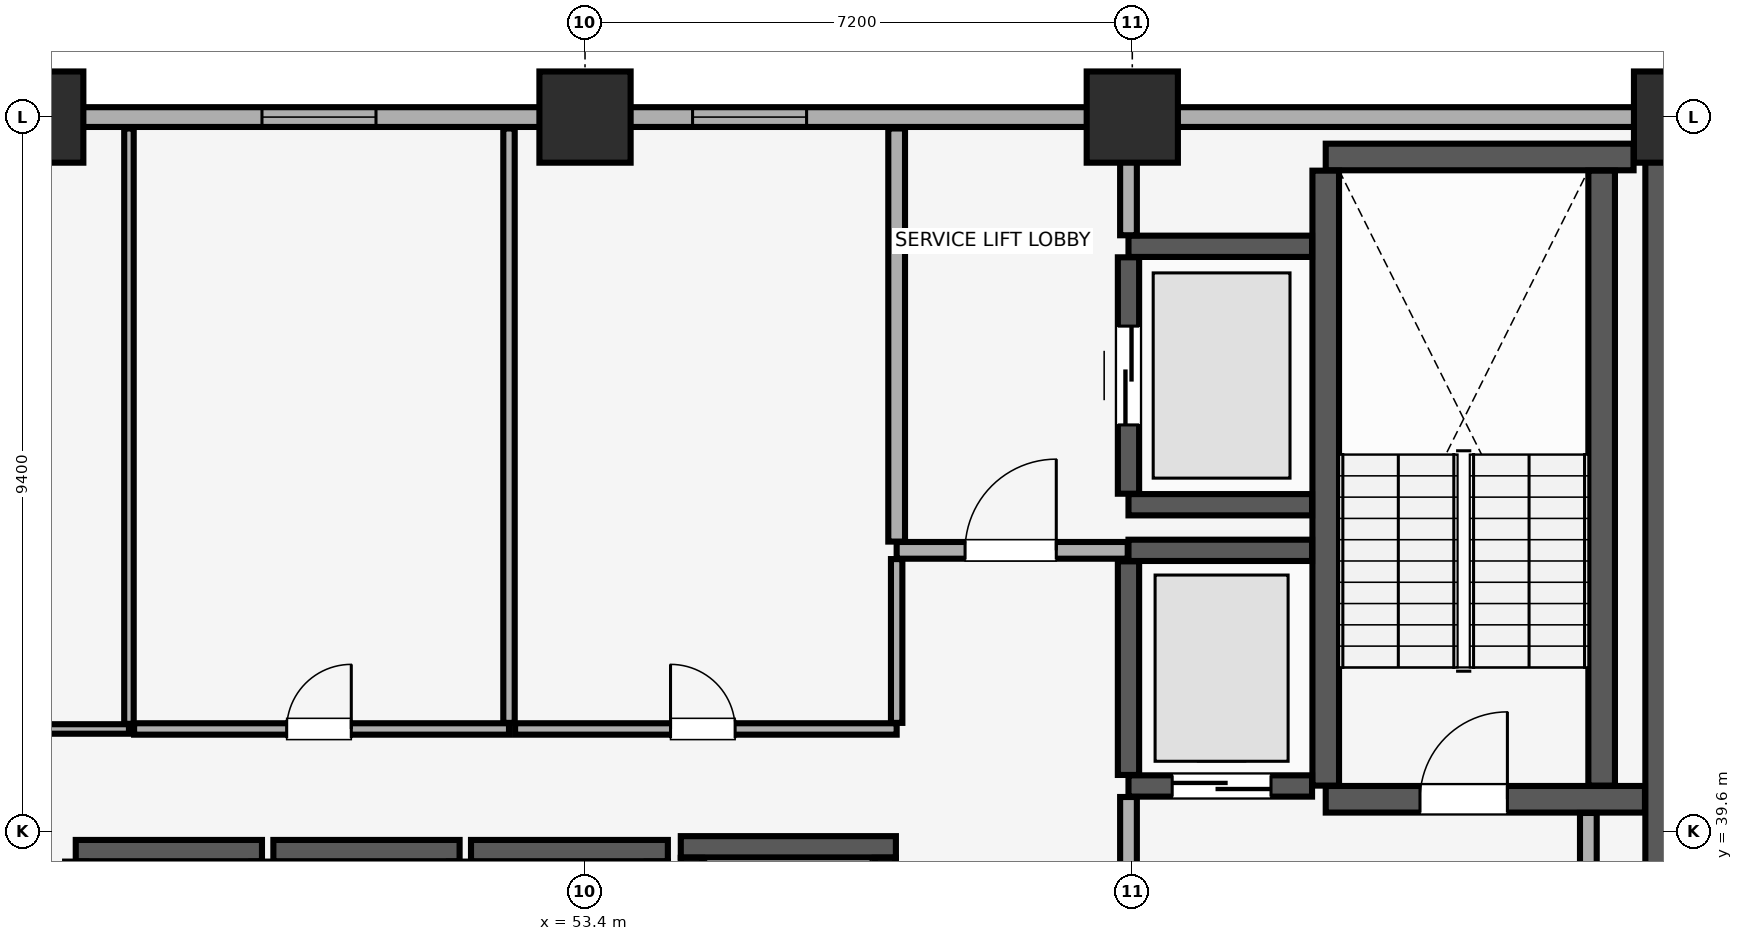
"""IFC4 building model, lengths in metres.
Left out: names, types, materials, properties, quantities, classifications, styles, units other than length and angle.
Written with IfcOpenShell. Run it as: python <this file> out.ifc"""

import sys

from ifc_helpers import new_model, si_unit, direction, frame, frame_2d, origin, origin_2d, place, context, subcontext, project, spatial, rectangle, extrude, element, fill, save


model = new_model("IFC4")
c1 = context("Model", 3, precision=1e-05, world=origin(), true_north=direction((0.0, 1.0)))
c2 = subcontext(c1, "Body", "Model", "MODEL_VIEW")
j1 = project(units=[si_unit("LENGTHUNIT", "METRE"), si_unit("PLANEANGLEUNIT", "RADIAN")], contexts=[c1])
p1 = place(None, origin())
s1 = spatial("IfcSite", under=j1, at=p1, CompositionType="ELEMENT")
p2 = place(p1, origin())
s2 = spatial("IfcBuilding", under=s1, at=p2, CompositionType="ELEMENT")
p3 = place(p2, frame((0.0, 0.0, 104.3)))
s3 = spatial("IfcBuildingStorey", under=s2, at=p3, CompositionType="ELEMENT", Elevation=104.3)
for number, where, z_axis, x_axis in (
    (1, (46.2, 49.0, 0.0), (0.0, 0.0, 1.0), (1.0, 0.0, 0.0)),
    (2, (53.4, 49.0, 0.0), (0.0, 0.0, 1.0), (1.0, 0.0, 0.0)),
    (3, (60.6, 49.0, 0.0), (0.0, 0.0, 1.0), (1.0, 0.0, 0.0)),
    (4, (67.8, 49.0, 0.0), (0.0, 0.0, 1.0), (1.0, 0.0, 0.0)),
):
    element("IfcColumn", number, at=place(p3, frame(where, z_axis=z_axis, x_axis=x_axis)), inside=s3, PredefinedType="COLUMN", context=c2, shape_type="SweptSolid", body=[
        extrude(rectangle(XDim=1.2, YDim=1.2, at=origin_2d()), origin(), (0.0, 0.0, 1.0), 3.51),
    ])
p4 = place(p3, frame((79.8, 49.0, 0.0), z_axis=(0.0, 0.0, 1.0), x_axis=(-1.0, 0.0, 0.0)))
e5 = element("IfcWall", 5, at=p4, inside=s3, PredefinedType="SOLIDWALL", context=c2, shape_type="SweptSolid", body=[
    extrude(rectangle(XDim=75.6, YDim=0.26, at=frame_2d((37.8, 0.0))), origin(), (0.0, 0.0, 1.0), 2.56),
])
p5 = place(p4, frame((72.565, 0.0, 0.85)))
e6 = element("IfcOpeningElement", 6, at=p5, cuts=e5, PredefinedType="OPENING", context=c2, shape_type="SweptSolid", body=[
    extrude(rectangle(XDim=1.5, YDim=1.4, at=frame_2d((0.75, 0.7))), frame((0.0, 0.14, 0.0), z_axis=(0.0, -1.0, 0.0), x_axis=(1.0, 0.0, 0.0)), (0.0, 0.0, 1.0), 0.28),
])
p6 = place(p4, frame((67.45, 0.0, 0.85)))
e7 = element("IfcOpeningElement", 7, at=p6, cuts=e5, PredefinedType="OPENING", context=c2, shape_type="SweptSolid", body=[
    extrude(rectangle(XDim=1.5, YDim=1.4, at=frame_2d((0.75, 0.7))), frame((0.0, 0.14, 0.0), z_axis=(0.0, -1.0, 0.0), x_axis=(1.0, 0.0, 0.0)), (0.0, 0.0, 1.0), 0.28),
])
p7 = place(p4, frame((6.65, 0.0, 0.85)))
e8 = element("IfcOpeningElement", 8, at=p7, cuts=e5, PredefinedType="OPENING", context=c2, shape_type="SweptSolid", body=[
    extrude(rectangle(XDim=1.5, YDim=1.4, at=frame_2d((0.75, 0.7))), frame((0.0, 0.14, 0.0), z_axis=(0.0, -1.0, 0.0), x_axis=(1.0, 0.0, 0.0)), (0.0, 0.0, 1.0), 0.28),
])
p8 = place(p4, frame((1.535, 0.0, 0.85)))
e9 = element("IfcOpeningElement", 9, at=p8, cuts=e5, PredefinedType="OPENING", context=c2, shape_type="SweptSolid", body=[
    extrude(rectangle(XDim=1.5, YDim=1.4, at=frame_2d((0.75, 0.7))), frame((0.0, 0.14, 0.0), z_axis=(0.0, -1.0, 0.0), x_axis=(1.0, 0.0, 0.0)), (0.0, 0.0, 1.0), 0.28),
])
p9 = place(p4, frame((51.365, 0.0, 0.9)))
e10 = element("IfcOpeningElement", 10, at=p9, cuts=e5, PredefinedType="OPENING", context=c2, shape_type="SweptSolid", body=[
    extrude(rectangle(XDim=1.5, YDim=1.4, at=frame_2d((0.75, 0.7))), frame((0.0, 0.14, 0.0), z_axis=(0.0, -1.0, 0.0), x_axis=(1.0, 0.0, 0.0)), (0.0, 0.0, 1.0), 0.28),
])
p10 = place(p4, frame((46.0, 0.0, 0.9)))
e11 = element("IfcOpeningElement", 11, at=p10, cuts=e5, PredefinedType="OPENING", context=c2, shape_type="SweptSolid", body=[
    extrude(rectangle(XDim=1.5, YDim=1.4, at=frame_2d((0.75, 0.7))), frame((0.0, 0.14, 0.0), z_axis=(0.0, -1.0, 0.0), x_axis=(1.0, 0.0, 0.0)), (0.0, 0.0, 1.0), 0.28),
])
p11 = place(p4, frame((29.15, 0.0, 0.9)))
e12 = element("IfcOpeningElement", 12, at=p11, cuts=e5, PredefinedType="OPENING", context=c2, shape_type="SweptSolid", body=[
    extrude(rectangle(XDim=1.5, YDim=1.4, at=frame_2d((0.75, 0.7))), frame((0.0, 0.14, 0.0), z_axis=(0.0, -1.0, 0.0), x_axis=(1.0, 0.0, 0.0)), (0.0, 0.0, 1.0), 0.28),
])
p12 = place(p4, frame((23.485, 0.0, 0.9)))
e13 = element("IfcOpeningElement", 13, at=p12, cuts=e5, PredefinedType="OPENING", context=c2, shape_type="SweptSolid", body=[
    extrude(rectangle(XDim=1.5, YDim=1.4, at=frame_2d((0.75, 0.7))), frame((0.0, 0.14, 0.0), z_axis=(0.0, -1.0, 0.0), x_axis=(1.0, 0.0, 0.0)), (0.0, 0.0, 1.0), 0.28),
])
p13 = place(p3, frame((67.8, 29.4, 0.0), z_axis=(0.0, 0.0, 1.0), x_axis=(0.0, 1.0, 0.0)))
e14 = element("IfcWall", 14, at=p13, inside=s3, PredefinedType="SHEAR", context=c2, shape_type="SweptSolid", body=[
    extrude(rectangle(XDim=19.2, YDim=0.9, at=frame_2d((9.6, 0.0))), origin(), (0.0, 0.0, 1.0), 3.51),
])
p14 = place(p3, frame((63.145, 40.025, 0.0), z_axis=(0.0, 0.0, 1.0), x_axis=(1.0, 0.0, 0.0)))
e15 = element("IfcWall", 15, at=p14, inside=s3, PredefinedType="SHEAR", context=c2, shape_type="SweptSolid", body=[
    extrude(rectangle(XDim=4.2, YDim=0.35, at=frame_2d((2.1, 0.0))), origin(), (0.0, 0.0, 1.0), 3.51),
])
p15 = place(p14, frame((1.24, 0.0, 0.0)))
e16 = element("IfcOpeningElement", 16, at=p15, cuts=e15, PredefinedType="OPENING", context=c2, shape_type="SweptSolid", body=[
    extrude(rectangle(XDim=1.15, YDim=2.15, at=frame_2d((0.575, 1.075))), frame((0.0, 0.185, 0.0), z_axis=(0.0, -1.0, 0.0), x_axis=(1.0, 0.0, 0.0)), (0.0, 0.0, 1.0), 0.37),
])
p16 = place(p3, frame((63.145, 48.475, 0.0), z_axis=(0.0, 0.0, 1.0), x_axis=(1.0, 0.0, 0.0)))
e17 = element("IfcWall", 17, at=p16, inside=s3, PredefinedType="SHEAR", context=c2, shape_type="SweptSolid", body=[
    extrude(rectangle(XDim=4.05, YDim=0.35, at=frame_2d((2.025, 0.0))), origin(), (0.0, 0.0, 1.0), 3.51),
])
for number, where, z_axis, x_axis in (
    (18, (63.145, 40.205, 0.0), (0.0, 0.0, 1.0), (0.0, 1.0, 0.0)),
    (19, (66.775, 40.205, 0.0), (0.0, 0.0, 1.0), (0.0, 1.0, 0.0)),
):
    element("IfcWall", number, at=place(p3, frame(where, z_axis=z_axis, x_axis=x_axis)), inside=s3, PredefinedType="SHEAR", context=c2, shape_type="SweptSolid", body=[
        extrude(rectangle(XDim=8.09, YDim=0.35, at=frame_2d((4.045, 0.0))), origin(), (0.0, 0.0, 1.0), 3.51),
    ])
p17 = place(p3, frame((46.7, 39.35, 0.0), z_axis=(0.0, 0.0, 1.0), x_axis=(1.0, 0.0, 0.0)))
e20 = element("IfcWall", 20, at=p17, inside=s3, PredefinedType="SHEAR", context=c2, shape_type="SweptSolid", body=[
    extrude(rectangle(XDim=2.45, YDim=0.28, at=frame_2d((1.225, 0.0))), origin(), (0.0, 0.0, 1.0), 3.51),
])
for number, where, z_axis, x_axis in (
    (21, (46.7, 37.145, 0.0), (0.0, 0.0, 1.0), (0.0, 1.0, 0.0)),
    (22, (49.15, 37.145, 0.0), (0.0, 0.0, 1.0), (0.0, 1.0, 0.0)),
):
    element("IfcWall", number, at=place(p3, frame(where, z_axis=z_axis, x_axis=x_axis)), inside=s3, PredefinedType="SHEAR", context=c2, shape_type="SweptSolid", body=[
        extrude(rectangle(XDim=2.06, YDim=0.28, at=frame_2d((1.03, 0.0))), origin(), (0.0, 0.0, 1.0), 3.51),
    ])
p18 = place(p3, frame((49.3, 39.35, 0.0), z_axis=(0.0, 0.0, 1.0), x_axis=(1.0, 0.0, 0.0)))
e23 = element("IfcWall", 23, at=p18, inside=s3, PredefinedType="SHEAR", context=c2, shape_type="SweptSolid", body=[
    extrude(rectangle(XDim=2.45, YDim=0.28, at=frame_2d((1.225, 0.0))), origin(), (0.0, 0.0, 1.0), 3.51),
])
p19 = place(p3, frame((51.75, 37.145, 0.0), z_axis=(0.0, 0.0, 1.0), x_axis=(0.0, 1.0, 0.0)))
e24 = element("IfcWall", 24, at=p19, inside=s3, PredefinedType="SHEAR", context=c2, shape_type="SweptSolid", body=[
    extrude(rectangle(XDim=2.06, YDim=0.28, at=frame_2d((1.03, 0.0))), origin(), (0.0, 0.0, 1.0), 3.51),
])
p20 = place(p3, frame((51.9, 39.35, 0.0), z_axis=(0.0, 0.0, 1.0), x_axis=(1.0, 0.0, 0.0)))
e25 = element("IfcWall", 25, at=p20, inside=s3, PredefinedType="SHEAR", context=c2, shape_type="SweptSolid", body=[
    extrude(rectangle(XDim=2.59, YDim=0.28, at=frame_2d((1.295, 0.0))), origin(), (0.0, 0.0, 1.0), 3.51),
])
p21 = place(p3, frame((54.35, 37.145, 0.0), z_axis=(0.0, 0.0, 1.0), x_axis=(0.0, 1.0, 0.0)))
e26 = element("IfcWall", 26, at=p21, inside=s3, PredefinedType="SHEAR", context=c2, shape_type="SweptSolid", body=[
    extrude(rectangle(XDim=2.06, YDim=0.28, at=frame_2d((1.03, 0.0))), origin(), (0.0, 0.0, 1.0), 3.51),
])
p22 = place(p3, frame((54.66, 39.4, 0.0), z_axis=(0.0, 0.0, 1.0), x_axis=(1.0, 0.0, 0.0)))
e27 = element("IfcWall", 27, at=p22, inside=s3, PredefinedType="SHEAR", context=c2, shape_type="SweptSolid", body=[
    extrude(rectangle(XDim=2.83, YDim=0.28, at=frame_2d((1.415, 0.0))), origin(), (0.0, 0.0, 1.0), 3.51),
])
for number, where, z_axis, x_axis in (
    (28, (54.8, 37.145, 0.0), (0.0, 0.0, 1.0), (0.0, 1.0, 0.0)),
    (29, (57.35, 37.145, 0.0), (0.0, 0.0, 1.0), (0.0, 1.0, 0.0)),
):
    element("IfcWall", number, at=place(p3, frame(where, z_axis=z_axis, x_axis=x_axis)), inside=s3, PredefinedType="SHEAR", context=c2, shape_type="SweptSolid", body=[
        extrude(rectangle(XDim=2.11, YDim=0.28, at=frame_2d((1.055, 0.0))), origin(), (0.0, 0.0, 1.0), 3.51),
    ])
p23 = place(p3, frame((60.55, 40.2, 0.0), z_axis=(0.0, 0.0, 1.0), x_axis=(1.0, 0.0, 0.0)))
e30 = element("IfcWall", 30, at=p23, inside=s3, PredefinedType="SHEAR", context=c2, shape_type="SweptSolid", body=[
    extrude(rectangle(XDim=2.415, YDim=0.28, at=frame_2d((1.208, 0.0))), origin(), (0.0, 0.0, 1.0), 3.51),
])
p24 = place(p23, frame((0.575, 0.0, 0.0)))
e31 = element("IfcOpeningElement", 31, at=p24, cuts=e30, PredefinedType="OPENING", context=c2, shape_type="SweptSolid", body=[
    extrude(rectangle(XDim=1.3, YDim=2.3, at=frame_2d((0.65, 1.15))), frame((0.0, 0.15, 0.0), z_axis=(0.0, -1.0, 0.0), x_axis=(1.0, 0.0, 0.0)), (0.0, 0.0, 1.0), 0.3),
])
p25 = place(p3, frame((60.55, 43.3, 0.0), z_axis=(0.0, 0.0, 1.0), x_axis=(1.0, 0.0, 0.0)))
e32 = element("IfcWall", 32, at=p25, inside=s3, PredefinedType="SHEAR", context=c2, shape_type="SweptSolid", body=[
    extrude(rectangle(XDim=2.415, YDim=0.28, at=frame_2d((1.208, 0.0))), origin(), (0.0, 0.0, 1.0), 3.51),
])
p26 = place(p3, frame((60.55, 40.345, 0.0), z_axis=(0.0, 0.0, 1.0), x_axis=(0.0, 1.0, 0.0)))
e33 = element("IfcWall", 33, at=p26, inside=s3, PredefinedType="SHEAR", context=c2, shape_type="SweptSolid", body=[
    extrude(rectangle(XDim=2.81, YDim=0.28, at=frame_2d((1.405, 0.0))), origin(), (0.0, 0.0, 1.0), 3.51),
])
for number, where, z_axis, x_axis in (
    (34, (60.55, 43.9, 0.0), (0.0, 0.0, 1.0), (1.0, 0.0, 0.0)),
    (35, (60.55, 47.3, 0.0), (0.0, 0.0, 1.0), (1.0, 0.0, 0.0)),
):
    element("IfcWall", number, at=place(p3, frame(where, z_axis=z_axis, x_axis=x_axis)), inside=s3, PredefinedType="SHEAR", context=c2, shape_type="SweptSolid", body=[
        extrude(rectangle(XDim=2.415, YDim=0.28, at=frame_2d((1.208, 0.0))), origin(), (0.0, 0.0, 1.0), 3.51),
    ])
p27 = place(p3, frame((60.55, 44.045, 0.0), z_axis=(0.0, 0.0, 1.0), x_axis=(0.0, 1.0, 0.0)))
e36 = element("IfcWall", 36, at=p27, inside=s3, PredefinedType="SHEAR", context=c2, shape_type="SweptSolid", body=[
    extrude(rectangle(XDim=3.11, YDim=0.28, at=frame_2d((1.555, 0.0))), origin(), (0.0, 0.0, 1.0), 3.51),
])
p28 = place(p27, frame((0.905, 0.0, 0.0)))
e37 = element("IfcOpeningElement", 37, at=p28, cuts=e36, PredefinedType="OPENING", context=c2, shape_type="SweptSolid", body=[
    extrude(rectangle(XDim=1.3, YDim=2.3, at=frame_2d((0.65, 1.15))), frame((0.0, 0.15, 0.0), z_axis=(0.0, -1.0, 0.0), x_axis=(1.0, 0.0, 0.0)), (0.0, 0.0, 1.0), 0.3),
])
p29 = place(p3, frame((60.55, 34.415, 0.0), z_axis=(0.0, 0.0, 1.0), x_axis=(0.0, 1.0, 0.0)))
e38 = element("IfcWall", 38, at=p29, inside=s3, PredefinedType="PARTITIONING", context=c2, shape_type="SweptSolid", body=[
    extrude(rectangle(XDim=5.64, YDim=0.22, at=frame_2d((2.82, 0.0))), origin(), (0.0, 0.0, 1.0), 3.51),
])
p30 = place(p3, frame((66.6, 34.415, 0.0), z_axis=(0.0, 0.0, 1.0), x_axis=(0.0, 1.0, 0.0)))
e39 = element("IfcWall", 39, at=p30, inside=s3, PredefinedType="PARTITIONING", context=c2, shape_type="SweptSolid", body=[
    extrude(rectangle(XDim=5.43, YDim=0.22, at=frame_2d((2.715, 0.0))), origin(), (0.0, 0.0, 1.0), 3.51),
])
p31 = place(p3, frame((57.5, 43.3, 0.0), z_axis=(0.0, 0.0, 1.0), x_axis=(1.0, 0.0, 0.0)))
e40 = element("IfcWall", 40, at=p31, inside=s3, PredefinedType="PARTITIONING", context=c2, shape_type="SweptSolid", body=[
    extrude(rectangle(XDim=3.04, YDim=0.22, at=frame_2d((1.52, 0.0))), origin(), (0.0, 0.0, 1.0), 3.51),
])
p32 = place(p31, frame((0.9, 0.0, 0.0)))
e41 = element("IfcOpeningElement", 41, at=p32, cuts=e40, PredefinedType="OPENING", context=c2, shape_type="SweptSolid", body=[
    extrude(rectangle(XDim=1.2, YDim=2.15, at=frame_2d((0.6, 1.075))), frame((0.0, 0.12, 0.0), z_axis=(0.0, -1.0, 0.0), x_axis=(1.0, 0.0, 0.0)), (0.0, 0.0, 1.0), 0.24),
])
p33 = place(p3, frame((57.5, 43.415, 0.0), z_axis=(0.0, 0.0, 1.0), x_axis=(0.0, 1.0, 0.0)))
e42 = element("IfcWall", 42, at=p33, inside=s3, PredefinedType="PARTITIONING", context=c2, shape_type="SweptSolid", body=[
    extrude(rectangle(XDim=5.435, YDim=0.22, at=frame_2d((2.718, 0.0))), origin(), (0.0, 0.0, 1.0), 3.51),
])
p34 = place(p3, frame((60.55, 47.445, 0.0), z_axis=(0.0, 0.0, 1.0), x_axis=(0.0, 1.0, 0.0)))
e43 = element("IfcWall", 43, at=p34, inside=s3, PredefinedType="PARTITIONING", context=c2, shape_type="SweptSolid", body=[
    extrude(rectangle(XDim=1.405, YDim=0.22, at=frame_2d((0.703, 0.0))), origin(), (0.0, 0.0, 1.0), 3.51),
])
p35 = place(p3, frame((44.3, 40.95, 0.0), z_axis=(0.0, 0.0, 1.0), x_axis=(1.0, 0.0, 0.0)))
e44 = element("IfcWall", 44, at=p35, inside=s3, PredefinedType="PARTITIONING", context=c2, shape_type="SweptSolid", body=[
    extrude(rectangle(XDim=3.1, YDim=0.125, at=frame_2d((1.55, 0.0))), origin(), (0.0, 0.0, 1.0), 3.51),
])
p36 = place(p35, frame((1.1, 0.0, 0.0)))
e45 = element("IfcOpeningElement", 45, at=p36, cuts=e44, PredefinedType="OPENING", context=c2, shape_type="SweptSolid", body=[
    extrude(rectangle(XDim=0.9, YDim=2.1, at=frame_2d((0.45, 1.05))), frame((0.0, 0.073, 0.0), z_axis=(0.0, -1.0, 0.0), x_axis=(1.0, 0.0, 0.0)), (0.0, 0.0, 1.0), 0.145),
])
p37 = place(p3, frame((47.4, 41.018, 0.0), z_axis=(0.0, 0.0, 1.0), x_axis=(0.0, 1.0, 0.0)))
e46 = element("IfcWall", 46, at=p37, inside=s3, PredefinedType="PARTITIONING", context=c2, shape_type="SweptSolid", body=[
    extrude(rectangle(XDim=7.833, YDim=0.125, at=frame_2d((3.916, 0.0))), origin(), (0.0, 0.0, 1.0), 3.51),
])
p38 = place(p3, frame((47.468, 40.95, 0.0), z_axis=(0.0, 0.0, 1.0), x_axis=(1.0, 0.0, 0.0)))
e47 = element("IfcWall", 47, at=p38, inside=s3, PredefinedType="PARTITIONING", context=c2, shape_type="SweptSolid", body=[
    extrude(rectangle(XDim=4.932, YDim=0.15, at=frame_2d((2.466, 0.0))), origin(), (0.0, 0.0, 1.0), 3.51),
])
p39 = place(p38, frame((2.008, 0.0, 0.0)))
e48 = element("IfcOpeningElement", 48, at=p39, cuts=e47, PredefinedType="OPENING", context=c2, shape_type="SweptSolid", body=[
    extrude(rectangle(XDim=0.85, YDim=2.1, at=frame_2d((0.425, 1.05))), frame((0.0, 0.085, 0.0), z_axis=(0.0, -1.0, 0.0), x_axis=(1.0, 0.0, 0.0)), (0.0, 0.0, 1.0), 0.17),
])
p40 = place(p3, frame((52.4, 41.03, 0.0), z_axis=(0.0, 0.0, 1.0), x_axis=(0.0, 1.0, 0.0)))
e49 = element("IfcWall", 49, at=p40, inside=s3, PredefinedType="PARTITIONING", context=c2, shape_type="SweptSolid", body=[
    extrude(rectangle(XDim=7.82, YDim=0.15, at=frame_2d((3.91, 0.0))), origin(), (0.0, 0.0, 1.0), 3.51),
])
p41 = place(p3, frame((52.48, 40.95, 0.0), z_axis=(0.0, 0.0, 1.0), x_axis=(1.0, 0.0, 0.0)))
e50 = element("IfcWall", 50, at=p41, inside=s3, PredefinedType="PARTITIONING", context=c2, shape_type="SweptSolid", body=[
    extrude(rectangle(XDim=5.02, YDim=0.15, at=frame_2d((2.51, 0.0))), origin(), (0.0, 0.0, 1.0), 3.51),
])
p42 = place(p41, frame((2.045, 0.0, 0.0)))
e51 = element("IfcOpeningElement", 51, at=p42, cuts=e50, PredefinedType="OPENING", context=c2, shape_type="SweptSolid", body=[
    extrude(rectangle(XDim=0.85, YDim=2.1, at=frame_2d((0.425, 1.05))), frame((0.0, 0.085, 0.0), z_axis=(0.0, -1.0, 0.0), x_axis=(1.0, 0.0, 0.0)), (0.0, 0.0, 1.0), 0.17),
])
p43 = place(p3, frame((57.5, 41.03, 0.0), z_axis=(0.0, 0.0, 1.0), x_axis=(0.0, 1.0, 0.0)))
e52 = element("IfcWall", 52, at=p43, inside=s3, PredefinedType="PARTITIONING", context=c2, shape_type="SweptSolid", body=[
    extrude(rectangle(XDim=2.155, YDim=0.15, at=frame_2d((1.078, 0.0))), origin(), (0.0, 0.0, 1.0), 3.51),
])
p44 = place(p11, origin())
e53 = element("IfcWindow", 53, at=p44, inside=s3, PartitioningType="SINGLE_PANEL", PredefinedType="WINDOW", context=c2, shape_type="SweptSolid", body=[
    extrude(rectangle(XDim=1.5, YDim=1.4, at=frame_2d((0.75, 0.7))), frame((0.0, 0.03, 0.0), z_axis=(0.0, -1.0, 0.0), x_axis=(1.0, 0.0, 0.0)), (0.0, 0.0, 1.0), 0.06),
])
fill(e12, e53)
p45 = place(p12, origin())
e54 = element("IfcWindow", 54, at=p45, inside=s3, PartitioningType="SINGLE_PANEL", PredefinedType="WINDOW", context=c2, shape_type="SweptSolid", body=[
    extrude(rectangle(XDim=1.5, YDim=1.4, at=frame_2d((0.75, 0.7))), frame((0.0, 0.03, 0.0), z_axis=(0.0, -1.0, 0.0), x_axis=(1.0, 0.0, 0.0)), (0.0, 0.0, 1.0), 0.06),
])
fill(e13, e54)
p46 = place(p15, origin())
e55 = element("IfcDoor", 55, at=p46, inside=s3, OperationType="SINGLE_SWING_RIGHT", PredefinedType="DOOR", context=c2, shape_type="SweptSolid", body=[
    extrude(rectangle(XDim=1.15, YDim=2.15, at=frame_2d((0.575, 1.075))), frame((0.0, 0.025, 0.0), z_axis=(0.0, -1.0, 0.0), x_axis=(1.0, 0.0, 0.0)), (0.0, 0.0, 1.0), 0.05),
])
fill(e16, e55)
p47 = place(p24, origin())
e56 = element("IfcDoor", 56, at=p47, inside=s3, OperationType="DOUBLE_DOOR_SLIDING", PredefinedType="DOOR", context=c2, shape_type="SweptSolid", body=[
    extrude(rectangle(XDim=1.3, YDim=2.3, at=frame_2d((0.65, 1.15))), frame((0.0, 0.025, 0.0), z_axis=(0.0, -1.0, 0.0), x_axis=(1.0, 0.0, 0.0)), (0.0, 0.0, 1.0), 0.05),
])
fill(e31, e56)
p48 = place(p28, origin())
e57 = element("IfcDoor", 57, at=p48, inside=s3, OperationType="DOUBLE_DOOR_SLIDING", PredefinedType="DOOR", context=c2, shape_type="SweptSolid", body=[
    extrude(rectangle(XDim=1.3, YDim=2.3, at=frame_2d((0.65, 1.15))), frame((0.0, 0.025, 0.0), z_axis=(0.0, -1.0, 0.0), x_axis=(1.0, 0.0, 0.0)), (0.0, 0.0, 1.0), 0.05),
])
fill(e37, e57)
p49 = place(p32, origin())
e58 = element("IfcDoor", 58, at=p49, inside=s3, OperationType="SINGLE_SWING_RIGHT", PredefinedType="DOOR", context=c2, shape_type="SweptSolid", body=[
    extrude(rectangle(XDim=1.2, YDim=2.15, at=frame_2d((0.6, 1.075))), frame((0.0, 0.025, 0.0), z_axis=(0.0, -1.0, 0.0), x_axis=(1.0, 0.0, 0.0)), (0.0, 0.0, 1.0), 0.05),
])
fill(e41, e58)
p50 = place(p39, origin())
e59 = element("IfcDoor", 59, at=p50, inside=s3, OperationType="SINGLE_SWING_RIGHT", PredefinedType="DOOR", context=c2, shape_type="SweptSolid", body=[
    extrude(rectangle(XDim=0.85, YDim=2.1, at=frame_2d((0.425, 1.05))), frame((0.0, 0.025, 0.0), z_axis=(0.0, -1.0, 0.0), x_axis=(1.0, 0.0, 0.0)), (0.0, 0.0, 1.0), 0.05),
])
fill(e48, e59)
p51 = place(p42, origin())
e60 = element("IfcDoor", 60, at=p51, inside=s3, OperationType="SINGLE_SWING_LEFT", PredefinedType="DOOR", context=c2, shape_type="SweptSolid", body=[
    extrude(rectangle(XDim=0.85, YDim=2.1, at=frame_2d((0.425, 1.05))), frame((0.0, 0.025, 0.0), z_axis=(0.0, -1.0, 0.0), x_axis=(1.0, 0.0, 0.0)), (0.0, 0.0, 1.0), 0.05),
])
fill(e51, e60)
save(model, sys.argv[1])
